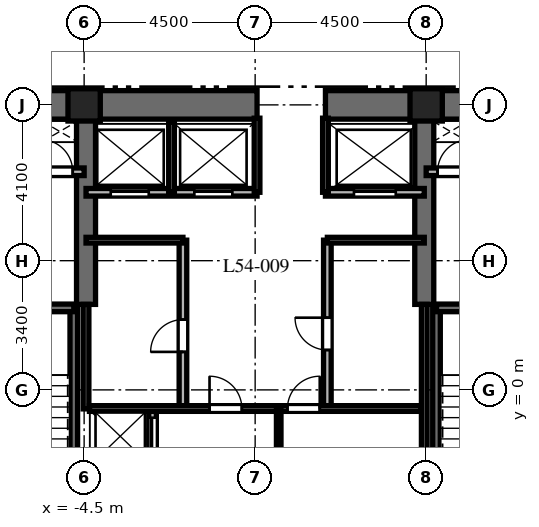
"""IFC4 building model, lengths in metres.
Left out: names, types, materials, properties, quantities, classifications, styles, units other than length and angle.
Written with IfcOpenShell. Run it as: python <this file> out.ifc"""

import sys

from ifc_helpers import new_model, si_unit, direction, frame, frame_2d, origin, origin_2d, place, context, subcontext, project, spatial, rectangle, extrude, element, fill, save


model = new_model("IFC4")
c1 = context("Model", 3, precision=1e-05, world=origin(), true_north=direction((0.0, 1.0)))
c2 = subcontext(c1, "Body", "Model", "MODEL_VIEW")
j1 = project(units=[si_unit("LENGTHUNIT", "METRE"), si_unit("PLANEANGLEUNIT", "RADIAN")], contexts=[c1])
p1 = place(None, origin())
s1 = spatial("IfcSite", under=j1, at=p1, CompositionType="ELEMENT")
p2 = place(p1, origin())
s2 = spatial("IfcBuilding", under=s1, at=p2, CompositionType="ELEMENT")
p3 = place(p2, frame((0.0, 0.0, 217.9)))
s3 = spatial("IfcBuildingStorey", under=s2, at=p3, CompositionType="ELEMENT", Elevation=217.9)
p4 = place(p3, frame((-9.375, 7.5, 0.0), z_axis=(0.0, 0.0, 1.0), x_axis=(1.0, 0.0, 0.0)))
e1 = element("IfcWall", 1, at=p4, inside=s3, PredefinedType="SHEAR", context=c2, shape_type="SweptSolid", body=[
    extrude(rectangle(XDim=9.425, YDim=0.75, at=frame_2d((4.712, 0.0))), origin(), (0.0, 0.0, 1.0), 3.8),
])
p5 = place(p3, frame((1.85, 7.5, 0.0), z_axis=(0.0, 0.0, 1.0), x_axis=(1.0, 0.0, 0.0)))
e2 = element("IfcWall", 2, at=p5, inside=s3, PredefinedType="SHEAR", context=c2, shape_type="SweptSolid", body=[
    extrude(rectangle(XDim=7.525, YDim=0.75, at=frame_2d((3.762, 0.0))), origin(), (0.0, 0.0, 1.0), 3.8),
])
for number, where, z_axis, x_axis in (
    (3, (-4.45, 2.25, 0.0), (0.0, 0.0, 1.0), (0.0, 1.0, 0.0)),
    (4, (4.45, 2.25, 0.0), (0.0, 0.0, 1.0), (0.0, 1.0, 0.0)),
):
    element("IfcWall", number, at=place(p3, frame(where, z_axis=z_axis, x_axis=x_axis)), inside=s3, PredefinedType="SHEAR", context=c2, shape_type="SweptSolid", body=[
        extrude(rectangle(XDim=4.875, YDim=0.5, at=frame_2d((2.438, 0.0))), origin(), (0.0, 0.0, 1.0), 3.8),
    ])
p6 = place(p3, frame((-4.772, -6.985, 0.0), z_axis=(0.0, 0.0, 1.0), x_axis=(0.0, 1.0, 0.0)))
e5 = element("IfcWall", 5, at=p6, inside=s3, PredefinedType="SHEAR", context=c2, shape_type="SweptSolid", body=[
    extrude(rectangle(XDim=9.143, YDim=0.2, at=frame_2d((4.572, 0.0))), origin(), (0.0, 0.0, 1.0), 3.8),
])
p7 = place(p3, frame((-8.458, 2.158, 0.0), z_axis=(0.0, 0.0, 1.0), x_axis=(1.0, 0.0, 0.0)))
e6 = element("IfcWall", 6, at=p7, inside=s3, PredefinedType="SHEAR", context=c2, shape_type="SweptSolid", body=[
    extrude(rectangle(XDim=3.686, YDim=0.2, at=frame_2d((1.843, 0.0))), origin(), (0.0, 0.0, 1.0), 3.8),
])
p8 = place(p7, frame((1.3, 0.0, 0.0)))
e7 = element("IfcOpeningElement", 7, at=p8, cuts=e6, PredefinedType="OPENING", context=c2, shape_type="SweptSolid", body=[
    extrude(rectangle(XDim=1.0, YDim=2.15, at=frame_2d((0.5, 1.075))), frame((0.0, 0.11, 0.0), z_axis=(0.0, -1.0, 0.0), x_axis=(1.0, 0.0, 0.0)), (0.0, 0.0, 1.0), 0.22),
])
p9 = place(p3, frame((4.772, -6.985, 0.0), z_axis=(0.0, 0.0, 1.0), x_axis=(0.0, 1.0, 0.0)))
e8 = element("IfcWall", 8, at=p9, inside=s3, PredefinedType="SHEAR", context=c2, shape_type="SweptSolid", body=[
    extrude(rectangle(XDim=9.143, YDim=0.2, at=frame_2d((4.572, 0.0))), origin(), (0.0, 0.0, 1.0), 3.8),
])
p10 = place(p3, frame((4.772, 2.158, 0.0), z_axis=(0.0, 0.0, 1.0), x_axis=(1.0, 0.0, 0.0)))
e9 = element("IfcWall", 9, at=p10, inside=s3, PredefinedType="SHEAR", context=c2, shape_type="SweptSolid", body=[
    extrude(rectangle(XDim=3.686, YDim=0.2, at=frame_2d((1.843, 0.0))), origin(), (0.0, 0.0, 1.0), 3.8),
])
p11 = place(p10, frame((1.35, 0.0, 0.0)))
e10 = element("IfcOpeningElement", 10, at=p11, cuts=e9, PredefinedType="OPENING", context=c2, shape_type="SweptSolid", body=[
    extrude(rectangle(XDim=1.0, YDim=2.15, at=frame_2d((0.5, 1.075))), frame((0.0, 0.11, 0.0), z_axis=(0.0, -1.0, 0.0), x_axis=(1.0, 0.0, 0.0)), (0.0, 0.0, 1.0), 0.22),
])
for number, where, z_axis, x_axis in (
    (11, (4.5, 7.5, 0.0), (0.0, 0.0, 1.0), (1.0, 0.0, 0.0)),
    (12, (-4.5, 7.5, 0.0), (0.0, 0.0, 1.0), (1.0, 0.0, 0.0)),
):
    element("IfcColumn", number, at=place(p3, frame(where, z_axis=z_axis, x_axis=x_axis)), inside=s3, PredefinedType="COLUMN", context=c2, shape_type="SweptSolid", body=[
        extrude(rectangle(XDim=0.85, YDim=0.85, at=origin_2d()), origin(), (0.0, 0.0, 1.0), 3.8),
    ])
p12 = place(p3, frame((-8.55, 5.74, 0.0), z_axis=(0.0, 0.0, 1.0), x_axis=(1.0, 0.0, 0.0)))
e13 = element("IfcWall", 13, at=p12, inside=s3, PredefinedType="PARTITIONING", context=c2, shape_type="SweptSolid", body=[
    extrude(rectangle(XDim=4.05, YDim=0.2, at=frame_2d((2.025, 0.0))), origin(), (0.0, 0.0, 1.0), 3.5),
])
p13 = place(p12, frame((0.75, 0.0, 0.0)))
e14 = element("IfcOpeningElement", 14, at=p13, cuts=e13, PredefinedType="OPENING", context=c2, shape_type="SweptSolid", body=[
    extrude(rectangle(XDim=1.1, YDim=2.2, at=frame_2d((0.55, 1.1))), frame((0.0, 0.11, 0.0), z_axis=(0.0, -1.0, 0.0), x_axis=(1.0, 0.0, 0.0)), (0.0, 0.0, 1.0), 0.22),
])
p14 = place(p12, frame((2.9, 0.0, 0.0)))
e15 = element("IfcOpeningElement", 15, at=p14, cuts=e13, PredefinedType="OPENING", context=c2, shape_type="SweptSolid", body=[
    extrude(rectangle(XDim=0.85, YDim=2.03, at=frame_2d((0.425, 1.015))), frame((0.0, 0.11, 0.0), z_axis=(0.0, -1.0, 0.0), x_axis=(1.0, 0.0, 0.0)), (0.0, 0.0, 1.0), 0.22),
])
p15 = place(p3, frame((4.5, 5.74, 0.0), z_axis=(0.0, 0.0, 1.0), x_axis=(1.0, 0.0, 0.0)))
e16 = element("IfcWall", 16, at=p15, inside=s3, PredefinedType="PARTITIONING", context=c2, shape_type="SweptSolid", body=[
    extrude(rectangle(XDim=4.05, YDim=0.2, at=frame_2d((2.025, 0.0))), origin(), (0.0, 0.0, 1.0), 3.5),
])
p16 = place(p15, frame((0.3, 0.0, 0.0)))
e17 = element("IfcOpeningElement", 17, at=p16, cuts=e16, PredefinedType="OPENING", context=c2, shape_type="SweptSolid", body=[
    extrude(rectangle(XDim=0.85, YDim=2.03, at=frame_2d((0.425, 1.015))), frame((0.0, 0.11, 0.0), z_axis=(0.0, -1.0, 0.0), x_axis=(1.0, 0.0, 0.0)), (0.0, 0.0, 1.0), 0.22),
])
p17 = place(p15, frame((2.15, 0.0, 0.0)))
e18 = element("IfcOpeningElement", 18, at=p17, cuts=e16, PredefinedType="OPENING", context=c2, shape_type="SweptSolid", body=[
    extrude(rectangle(XDim=1.1, YDim=2.2, at=frame_2d((0.55, 1.1))), frame((0.0, 0.11, 0.0), z_axis=(0.0, -1.0, 0.0), x_axis=(1.0, 0.0, 0.0)), (0.0, 0.0, 1.0), 0.22),
])
p18 = place(p3, frame((-2.7, -1.972, 0.0), z_axis=(0.0, 0.0, 1.0), x_axis=(0.0, 1.0, 0.0)))
e19 = element("IfcWall", 19, at=p18, inside=s3, PredefinedType="PARTITIONING", context=c2, shape_type="SweptSolid", body=[
    extrude(rectangle(XDim=1.472, YDim=0.2, at=frame_2d((0.736, 0.0))), origin(), (0.0, 0.0, 1.0), 3.5),
])
p19 = place(p18, frame((0.24, 0.0, 0.0)))
e20 = element("IfcOpeningElement", 20, at=p19, cuts=e19, PredefinedType="OPENING", context=c2, shape_type="SweptSolid", body=[
    extrude(rectangle(XDim=1.0, YDim=2.2, at=frame_2d((0.5, 1.1))), frame((0.0, 0.11, 0.0), z_axis=(0.0, -1.0, 0.0), x_axis=(1.0, 0.0, 0.0)), (0.0, 0.0, 1.0), 0.22),
])
p20 = place(p3, frame((-4.45, 5.2, 0.0), z_axis=(0.0, 0.0, 1.0), x_axis=(1.0, 0.0, 0.0)))
e21 = element("IfcWall", 21, at=p20, inside=s3, PredefinedType="PARTITIONING", context=c2, shape_type="SweptSolid", body=[
    extrude(rectangle(XDim=4.5, YDim=0.2, at=frame_2d((2.25, 0.0))), origin(), (0.0, 0.0, 1.0), 3.5),
])
p21 = place(p20, frame((0.65, 0.0, 0.0)))
e22 = element("IfcOpeningElement", 22, at=p21, cuts=e21, PredefinedType="OPENING", context=c2, shape_type="SweptSolid", body=[
    extrude(rectangle(XDim=1.0, YDim=2.2, at=frame_2d((0.5, 1.1))), frame((0.0, 0.11, 0.0), z_axis=(0.0, -1.0, 0.0), x_axis=(1.0, 0.0, 0.0)), (0.0, 0.0, 1.0), 0.22),
])
p22 = place(p20, frame((2.85, 0.0, 0.0)))
e23 = element("IfcOpeningElement", 23, at=p22, cuts=e21, PredefinedType="OPENING", context=c2, shape_type="SweptSolid", body=[
    extrude(rectangle(XDim=1.0, YDim=2.2, at=frame_2d((0.5, 1.1))), frame((0.0, 0.11, 0.0), z_axis=(0.0, -1.0, 0.0), x_axis=(1.0, 0.0, 0.0)), (0.0, 0.0, 1.0), 0.22),
])
p23 = place(p3, frame((1.85, 5.2, 0.0), z_axis=(0.0, 0.0, 1.0), x_axis=(1.0, 0.0, 0.0)))
e24 = element("IfcWall", 24, at=p23, inside=s3, PredefinedType="PARTITIONING", context=c2, shape_type="SweptSolid", body=[
    extrude(rectangle(XDim=2.6, YDim=0.2, at=frame_2d((1.3, 0.0))), origin(), (0.0, 0.0, 1.0), 3.5),
])
p24 = place(p23, frame((0.75, 0.0, 0.0)))
e25 = element("IfcOpeningElement", 25, at=p24, cuts=e24, PredefinedType="OPENING", context=c2, shape_type="SweptSolid", body=[
    extrude(rectangle(XDim=1.1, YDim=2.2, at=frame_2d((0.55, 1.1))), frame((0.0, 0.11, 0.0), z_axis=(0.0, -1.0, 0.0), x_axis=(1.0, 0.0, 0.0)), (0.0, 0.0, 1.0), 0.22),
])
p25 = place(p3, frame((-2.2, 5.2, 0.0), z_axis=(0.0, 0.0, 1.0), x_axis=(0.0, 1.0, 0.0)))
e26 = element("IfcWall", 26, at=p25, inside=s3, PredefinedType="PARTITIONING", context=c2, shape_type="SweptSolid", body=[
    extrude(rectangle(XDim=1.85, YDim=0.15, at=frame_2d((0.925, 0.0))), origin(), (0.0, 0.0, 1.0), 3.5),
])
for number, where, z_axis, x_axis in (
    (27, (0.05, 5.2, 0.0), (0.0, 0.0, 1.0), (0.0, 1.0, 0.0)),
    (28, (1.85, 5.2, 0.0), (0.0, 0.0, 1.0), (0.0, 1.0, 0.0)),
):
    element("IfcWall", number, at=place(p3, frame(where, z_axis=z_axis, x_axis=x_axis)), inside=s3, PredefinedType="PARTITIONING", context=c2, shape_type="SweptSolid", body=[
        extrude(rectangle(XDim=1.95, YDim=0.15, at=frame_2d((0.975, 0.0))), origin(), (0.0, 0.0, 1.0), 3.5),
    ])
p26 = place(p3, frame((-4.45, -0.5, 0.0), z_axis=(0.0, 0.0, 1.0), x_axis=(0.0, 1.0, 0.0)))
e29 = element("IfcWall", 29, at=p26, inside=s3, PredefinedType="PARTITIONING", context=c2, shape_type="SweptSolid", body=[
    extrude(rectangle(XDim=2.75, YDim=0.15, at=frame_2d((1.375, 0.0))), origin(), (0.0, 0.0, 1.0), 3.5),
])
p27 = place(p3, frame((4.45, -1.972, 0.0), z_axis=(0.0, 0.0, 1.0), x_axis=(0.0, 1.0, 0.0)))
e30 = element("IfcWall", 30, at=p27, inside=s3, PredefinedType="PARTITIONING", context=c2, shape_type="SweptSolid", body=[
    extrude(rectangle(XDim=4.222, YDim=0.15, at=frame_2d((2.111, 0.0))), origin(), (0.0, 0.0, 1.0), 3.5),
])
p28 = place(p3, frame((-1.9, -0.5, 0.0), z_axis=(0.0, 0.0, 1.0), x_axis=(0.0, 1.0, 0.0)))
e31 = element("IfcWall", 31, at=p28, inside=s3, PredefinedType="PARTITIONING", context=c2, shape_type="SweptSolid", body=[
    extrude(rectangle(XDim=4.44, YDim=0.2, at=frame_2d((2.22, 0.0))), origin(), (0.0, 0.0, 1.0), 3.5),
])
p29 = place(p28, frame((1.5, 0.0, 0.0)))
e32 = element("IfcOpeningElement", 32, at=p29, cuts=e31, PredefinedType="OPENING", context=c2, shape_type="SweptSolid", body=[
    extrude(rectangle(XDim=0.85, YDim=2.03, at=frame_2d((0.425, 1.015))), frame((0.0, 0.11, 0.0), z_axis=(0.0, -1.0, 0.0), x_axis=(1.0, 0.0, 0.0)), (0.0, 0.0, 1.0), 0.22),
])
p30 = place(p3, frame((-4.45, 3.94, 0.0), z_axis=(0.0, 0.0, 1.0), x_axis=(1.0, 0.0, 0.0)))
e33 = element("IfcWall", 33, at=p30, inside=s3, PredefinedType="PARTITIONING", context=c2, shape_type="SweptSolid", body=[
    extrude(rectangle(XDim=2.55, YDim=0.15, at=frame_2d((1.275, 0.0))), origin(), (0.0, 0.0, 1.0), 3.5),
])
p31 = place(p3, frame((1.9, -0.5, 0.0), z_axis=(0.0, 0.0, 1.0), x_axis=(0.0, 1.0, 0.0)))
e34 = element("IfcWall", 34, at=p31, inside=s3, PredefinedType="PARTITIONING", context=c2, shape_type="SweptSolid", body=[
    extrude(rectangle(XDim=4.44, YDim=0.2, at=frame_2d((2.22, 0.0))), origin(), (0.0, 0.0, 1.0), 3.5),
])
p32 = place(p31, frame((1.55, 0.0, 0.0)))
e35 = element("IfcOpeningElement", 35, at=p32, cuts=e34, PredefinedType="OPENING", context=c2, shape_type="SweptSolid", body=[
    extrude(rectangle(XDim=0.85, YDim=2.03, at=frame_2d((0.425, 1.015))), frame((0.0, 0.11, 0.0), z_axis=(0.0, -1.0, 0.0), x_axis=(1.0, 0.0, 0.0)), (0.0, 0.0, 1.0), 0.22),
])
p33 = place(p3, frame((1.9, 3.94, 0.0), z_axis=(0.0, 0.0, 1.0), x_axis=(1.0, 0.0, 0.0)))
e36 = element("IfcWall", 36, at=p33, inside=s3, PredefinedType="PARTITIONING", context=c2, shape_type="SweptSolid", body=[
    extrude(rectangle(XDim=2.55, YDim=0.15, at=frame_2d((1.275, 0.0))), origin(), (0.0, 0.0, 1.0), 3.5),
])
p34 = place(p3, frame((-4.36, -0.49, 0.0), z_axis=(0.0, 0.0, 1.0), x_axis=(1.0, 0.0, 0.0)))
e37 = element("IfcWall", 37, at=p34, inside=s3, PredefinedType="PARTITIONING", context=c2, shape_type="SweptSolid", body=[
    extrude(rectangle(XDim=8.72, YDim=0.15, at=frame_2d((4.36, 0.0))), origin(), (0.0, 0.0, 1.0), 3.5),
])
p35 = place(p34, frame((3.16, 0.0, 0.0)))
e38 = element("IfcOpeningElement", 38, at=p35, cuts=e37, PredefinedType="OPENING", context=c2, shape_type="SweptSolid", body=[
    extrude(rectangle(XDim=0.85, YDim=2.03, at=frame_2d((0.425, 1.015))), frame((0.0, 0.085, 0.0), z_axis=(0.0, -1.0, 0.0), x_axis=(1.0, 0.0, 0.0)), (0.0, 0.0, 1.0), 0.17),
])
p36 = place(p34, frame((5.21, 0.0, 0.0)))
e39 = element("IfcOpeningElement", 39, at=p36, cuts=e37, PredefinedType="OPENING", context=c2, shape_type="SweptSolid", body=[
    extrude(rectangle(XDim=0.85, YDim=2.03, at=frame_2d((0.425, 1.015))), frame((0.0, 0.085, 0.0), z_axis=(0.0, -1.0, 0.0), x_axis=(1.0, 0.0, 0.0)), (0.0, 0.0, 1.0), 0.17),
])
p37 = place(p3, frame((0.62, -1.972, 0.0), z_axis=(0.0, 0.0, 1.0), x_axis=(0.0, 1.0, 0.0)))
e40 = element("IfcWall", 40, at=p37, inside=s3, PredefinedType="PARTITIONING", context=c2, shape_type="SweptSolid", body=[
    extrude(rectangle(XDim=1.472, YDim=0.12, at=frame_2d((0.736, 0.0))), origin(), (0.0, 0.0, 1.0), 3.5),
])
p38 = place(p14, origin())
e41 = element("IfcDoor", 41, at=p38, inside=s3, OperationType="SINGLE_SWING_LEFT", PredefinedType="DOOR", context=c2, shape_type="SweptSolid", body=[
    extrude(rectangle(XDim=0.85, YDim=2.03, at=frame_2d((0.425, 1.015))), frame((0.0, 0.025, 0.0), z_axis=(0.0, -1.0, 0.0), x_axis=(1.0, 0.0, 0.0)), (0.0, 0.0, 1.0), 0.05),
])
fill(e15, e41)
p39 = place(p16, origin())
e42 = element("IfcDoor", 42, at=p39, inside=s3, OperationType="SINGLE_SWING_RIGHT", PredefinedType="DOOR", context=c2, shape_type="SweptSolid", body=[
    extrude(rectangle(XDim=0.85, YDim=2.03, at=frame_2d((0.425, 1.015))), frame((0.0, 0.025, 0.0), z_axis=(0.0, -1.0, 0.0), x_axis=(1.0, 0.0, 0.0)), (0.0, 0.0, 1.0), 0.05),
])
fill(e17, e42)
p40 = place(p19, origin())
e43 = element("IfcDoor", 43, at=p40, inside=s3, OperationType="SLIDING_TO_LEFT", PredefinedType="DOOR", context=c2, shape_type="SweptSolid", body=[
    extrude(rectangle(XDim=1.0, YDim=2.2, at=frame_2d((0.5, 1.1))), frame((0.0, 0.025, 0.0), z_axis=(0.0, -1.0, 0.0), x_axis=(1.0, 0.0, 0.0)), (0.0, 0.0, 1.0), 0.05),
])
fill(e20, e43)
p41 = place(p21, origin())
e44 = element("IfcDoor", 44, at=p41, inside=s3, OperationType="SLIDING_TO_LEFT", PredefinedType="DOOR", context=c2, shape_type="SweptSolid", body=[
    extrude(rectangle(XDim=1.0, YDim=2.2, at=frame_2d((0.5, 1.1))), frame((0.0, 0.025, 0.0), z_axis=(0.0, -1.0, 0.0), x_axis=(1.0, 0.0, 0.0)), (0.0, 0.0, 1.0), 0.05),
])
fill(e22, e44)
p42 = place(p22, origin())
e45 = element("IfcDoor", 45, at=p42, inside=s3, OperationType="SLIDING_TO_RIGHT", PredefinedType="DOOR", context=c2, shape_type="SweptSolid", body=[
    extrude(rectangle(XDim=1.0, YDim=2.2, at=frame_2d((0.5, 1.1))), frame((0.0, 0.025, 0.0), z_axis=(0.0, -1.0, 0.0), x_axis=(1.0, 0.0, 0.0)), (0.0, 0.0, 1.0), 0.05),
])
fill(e23, e45)
p43 = place(p24, origin())
e46 = element("IfcDoor", 46, at=p43, inside=s3, OperationType="SLIDING_TO_RIGHT", PredefinedType="DOOR", context=c2, shape_type="SweptSolid", body=[
    extrude(rectangle(XDim=1.1, YDim=2.2, at=frame_2d((0.55, 1.1))), frame((0.0, 0.025, 0.0), z_axis=(0.0, -1.0, 0.0), x_axis=(1.0, 0.0, 0.0)), (0.0, 0.0, 1.0), 0.05),
])
fill(e25, e46)
p44 = place(p29, origin())
e47 = element("IfcDoor", 47, at=p44, inside=s3, OperationType="SINGLE_SWING_LEFT", PredefinedType="DOOR", context=c2, shape_type="SweptSolid", body=[
    extrude(rectangle(XDim=0.85, YDim=2.03, at=frame_2d((0.425, 1.015))), frame((0.0, 0.025, 0.0), z_axis=(0.0, -1.0, 0.0), x_axis=(1.0, 0.0, 0.0)), (0.0, 0.0, 1.0), 0.05),
])
fill(e32, e47)
p45 = place(p32, origin())
e48 = element("IfcDoor", 48, at=p45, inside=s3, OperationType="SINGLE_SWING_RIGHT", PredefinedType="DOOR", context=c2, shape_type="SweptSolid", body=[
    extrude(rectangle(XDim=0.85, YDim=2.03, at=frame_2d((0.425, 1.015))), frame((0.0, 0.025, 0.0), z_axis=(0.0, -1.0, 0.0), x_axis=(1.0, 0.0, 0.0)), (0.0, 0.0, 1.0), 0.05),
])
fill(e35, e48)
p46 = place(p35, origin())
e49 = element("IfcDoor", 49, at=p46, inside=s3, OperationType="SINGLE_SWING_LEFT", PredefinedType="DOOR", context=c2, shape_type="SweptSolid", body=[
    extrude(rectangle(XDim=0.85, YDim=2.03, at=frame_2d((0.425, 1.015))), frame((0.0, 0.025, 0.0), z_axis=(0.0, -1.0, 0.0), x_axis=(1.0, 0.0, 0.0)), (0.0, 0.0, 1.0), 0.05),
])
fill(e38, e49)
p47 = place(p36, origin())
e50 = element("IfcDoor", 50, at=p47, inside=s3, OperationType="SINGLE_SWING_RIGHT", PredefinedType="DOOR", context=c2, shape_type="SweptSolid", body=[
    extrude(rectangle(XDim=0.85, YDim=2.03, at=frame_2d((0.425, 1.015))), frame((0.0, 0.025, 0.0), z_axis=(0.0, -1.0, 0.0), x_axis=(1.0, 0.0, 0.0)), (0.0, 0.0, 1.0), 0.05),
])
fill(e39, e50)
save(model, sys.argv[1])
